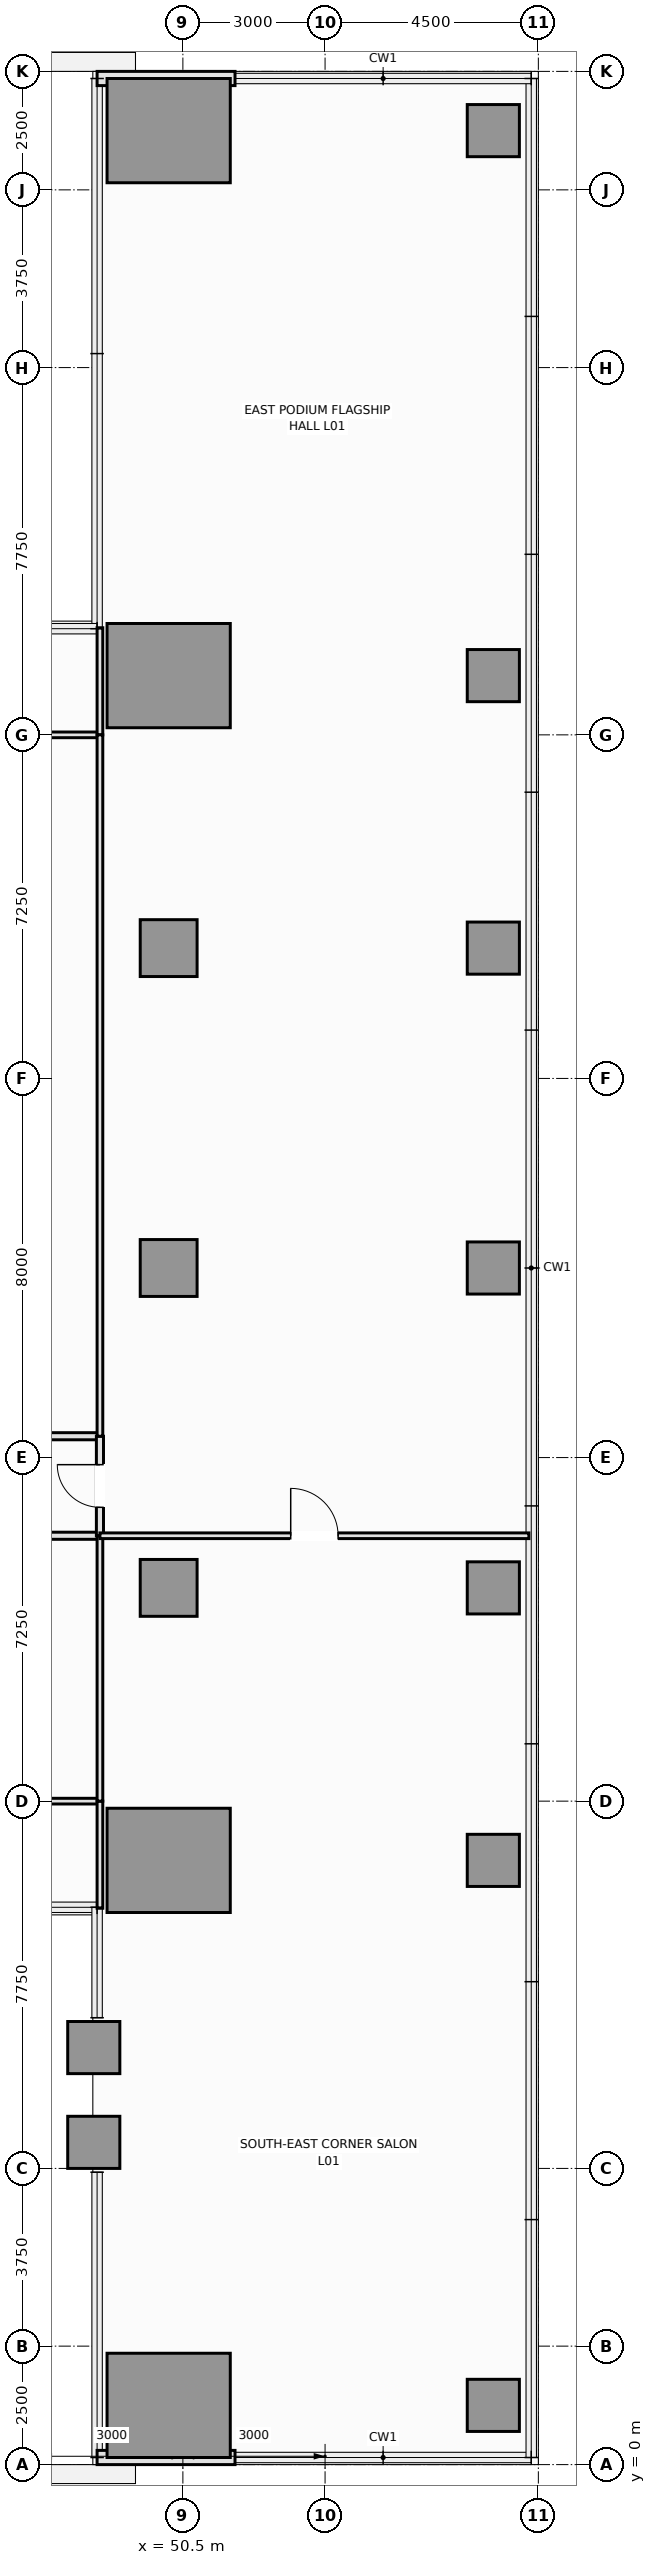
"""IFC4 building model, lengths in metres.
Left out: names, types, materials, properties, quantities, classifications, styles, units other than length and angle.
Written with IfcOpenShell. Run it as: python <this file> out.ifc"""

import sys

from ifc_helpers import new_model, si_unit, direction, frame, frame_2d, origin, origin_2d, place, context, subcontext, project, spatial, rectangle, extrude, element, fill, save


model = new_model("IFC4")
c1 = context("Model", 3, precision=1e-05, world=origin(), true_north=direction((0.0, 1.0)))
c2 = subcontext(c1, "Body", "Model", "MODEL_VIEW")
j1 = project(units=[si_unit("LENGTHUNIT", "METRE"), si_unit("PLANEANGLEUNIT", "RADIAN")], contexts=[c1])
p1 = place(None, origin())
s1 = spatial("IfcSite", under=j1, at=p1, CompositionType="ELEMENT")
p2 = place(p1, origin())
s2 = spatial("IfcBuilding", under=s1, at=p2, CompositionType="ELEMENT")
p3 = place(p2, frame((0.0, 0.0, 6.0)))
s3 = spatial("IfcBuildingStorey", under=s2, at=p3, CompositionType="ELEMENT", Elevation=6.0)
for number, where, z_axis, x_axis in (
    (1, (50.2, 1.25, 0.0), (0.0, 0.0, 1.0), (1.0, 0.0, 0.0)),
    (2, (50.2, 12.75, 0.0), (0.0, 0.0, 1.0), (1.0, 0.0, 0.0)),
    (3, (50.2, 37.75, 0.0), (0.0, 0.0, 1.0), (1.0, 0.0, 0.0)),
    (4, (50.2, 49.25, 0.0), (0.0, 0.0, 1.0), (1.0, 0.0, 0.0)),
):
    element("IfcColumn", number, at=place(p3, frame(where, z_axis=z_axis, x_axis=x_axis)), inside=s3, PredefinedType="COLUMN", context=c2, shape_type="SweptSolid", body=[
        extrude(rectangle(XDim=2.6, YDim=2.2, at=origin_2d()), origin(), (0.0, 0.0, 1.0), 4.8),
    ])
for number, where, z_axis, x_axis in (
    (5, (50.2, 18.5, 0.0), (0.0, 0.0, 1.0), (1.0, 0.0, 0.0)),
    (6, (50.2, 25.25, 0.0), (0.0, 0.0, 1.0), (1.0, 0.0, 0.0)),
    (7, (50.2, 32.0, 0.0), (0.0, 0.0, 1.0), (1.0, 0.0, 0.0)),
):
    element("IfcColumn", number, at=place(p3, frame(where, z_axis=z_axis, x_axis=x_axis)), inside=s3, PredefinedType="COLUMN", context=c2, shape_type="SweptSolid", body=[
        extrude(rectangle(XDim=1.2, YDim=1.2, at=origin_2d()), origin(), (0.0, 0.0, 1.0), 4.8),
    ])
for number, where, z_axis, x_axis in (
    (8, (57.05, 1.25, 0.0), (0.0, 0.0, 1.0), (1.0, 0.0, 0.0)),
    (9, (57.05, 12.75, 0.0), (0.0, 0.0, 1.0), (1.0, 0.0, 0.0)),
    (10, (57.05, 18.5, 0.0), (0.0, 0.0, 1.0), (1.0, 0.0, 0.0)),
    (11, (57.05, 25.25, 0.0), (0.0, 0.0, 1.0), (1.0, 0.0, 0.0)),
    (12, (57.05, 32.0, 0.0), (0.0, 0.0, 1.0), (1.0, 0.0, 0.0)),
    (13, (57.05, 37.75, 0.0), (0.0, 0.0, 1.0), (1.0, 0.0, 0.0)),
    (14, (57.05, 49.25, 0.0), (0.0, 0.0, 1.0), (1.0, 0.0, 0.0)),
    (15, (48.62, 6.8, 0.0), (0.0, 0.0, 1.0), (1.0, 0.0, 0.0)),
    (16, (48.62, 8.8, 0.0), (0.0, 0.0, 1.0), (1.0, 0.0, 0.0)),
):
    element("IfcColumn", number, at=place(p3, frame(where, z_axis=z_axis, x_axis=x_axis)), inside=s3, PredefinedType="COLUMN", context=c2, shape_type="SweptSolid", body=[
        extrude(rectangle(XDim=1.1, YDim=1.1, at=origin_2d()), origin(), (0.0, 0.0, 1.0), 4.8),
    ])
for number, where, z_axis, x_axis in (
    (17, (48.69, 0.15, 0.0), (0.0, 0.0, 1.0), (1.0, 0.0, 0.0)),
    (18, (51.6, 50.35, 0.0), (0.0, 0.0, 1.0), (-1.0, 0.0, 0.0)),
):
    element("IfcWall", number, at=place(p3, frame(where, z_axis=z_axis, x_axis=x_axis)), inside=s3, PredefinedType="SOLIDWALL", context=c2, shape_type="SweptSolid", body=[
        extrude(rectangle(XDim=2.91, YDim=0.3, at=frame_2d((1.455, 0.0))), origin(), (0.0, 0.0, 1.0), 4.6),
    ])
p4 = place(p3, frame((28.4, 19.6, 0.0), z_axis=(0.0, 0.0, 1.0), x_axis=(1.0, 0.0, 0.0)))
e19 = element("IfcWall", 19, at=p4, inside=s3, PredefinedType="PARTITIONING", context=c2, shape_type="SweptSolid", body=[
    extrude(rectangle(XDim=20.35, YDim=0.15, at=frame_2d((10.175, 0.0))), origin(), (0.0, 0.0, 1.0), 4.6),
])
p5 = place(p4, frame((10.796, 0.0, 0.0)))
e20 = element("IfcOpeningElement", 20, at=p5, cuts=e19, PredefinedType="OPENING", context=c2, shape_type="SweptSolid", body=[
    extrude(rectangle(XDim=1.0, YDim=2.15, at=frame_2d((0.5, 1.075))), frame((0.0, 0.085, 0.0), z_axis=(0.0, -1.0, 0.0), x_axis=(1.0, 0.0, 0.0)), (0.0, 0.0, 1.0), 0.17),
])
p6 = place(p3, frame((38.2, 21.7, 0.0), z_axis=(0.0, 0.0, 1.0), x_axis=(1.0, 0.0, 0.0)))
e21 = element("IfcWall", 21, at=p6, inside=s3, PredefinedType="PARTITIONING", context=c2, shape_type="SweptSolid", body=[
    extrude(rectangle(XDim=10.55, YDim=0.15, at=frame_2d((5.275, 0.0))), origin(), (0.0, 0.0, 1.0), 4.6),
])
p7 = place(p6, frame((4.775, 0.0, 0.0)))
e22 = element("IfcOpeningElement", 22, at=p7, cuts=e21, PredefinedType="OPENING", context=c2, shape_type="SweptSolid", body=[
    extrude(rectangle(XDim=1.0, YDim=2.15, at=frame_2d((0.5, 1.075))), frame((0.0, 0.085, 0.0), z_axis=(0.0, -1.0, 0.0), x_axis=(1.0, 0.0, 0.0)), (0.0, 0.0, 1.0), 0.17),
])
p8 = place(p3, frame((48.75, 19.6, 0.0), z_axis=(0.0, 0.0, 1.0), x_axis=(0.0, 1.0, 0.0)))
e23 = element("IfcWall", 23, at=p8, inside=s3, PredefinedType="PARTITIONING", context=c2, shape_type="SweptSolid", body=[
    extrude(rectangle(XDim=2.1, YDim=0.15, at=frame_2d((1.05, 0.0))), origin(), (0.0, 0.0, 1.0), 4.6),
])
p9 = place(p8, frame((0.6, 0.0, 0.0)))
e24 = element("IfcOpeningElement", 24, at=p9, cuts=e23, PredefinedType="OPENING", context=c2, shape_type="SweptSolid", body=[
    extrude(rectangle(XDim=0.9, YDim=2.1, at=frame_2d((0.45, 1.05))), frame((0.0, 0.085, 0.0), z_axis=(0.0, -1.0, 0.0), x_axis=(1.0, 0.0, 0.0)), (0.0, 0.0, 1.0), 0.17),
])
p10 = place(p3, frame((28.4, 14.0, 0.0), z_axis=(0.0, 0.0, 1.0), x_axis=(1.0, 0.0, 0.0)))
e25 = element("IfcWall", 25, at=p10, inside=s3, PredefinedType="PARTITIONING", context=c2, shape_type="SweptSolid", body=[
    extrude(rectangle(XDim=20.35, YDim=0.12, at=frame_2d((10.175, 0.0))), origin(), (0.0, 0.0, 1.0), 4.6),
])
p11 = place(p3, frame((48.75, 11.74, 0.0), z_axis=(0.0, 0.0, 1.0), x_axis=(0.0, 1.0, 0.0)))
e26 = element("IfcWall", 26, at=p11, inside=s3, PredefinedType="PARTITIONING", context=c2, shape_type="SweptSolid", body=[
    extrude(rectangle(XDim=2.26, YDim=0.12, at=frame_2d((1.13, 0.0))), origin(), (0.0, 0.0, 1.0), 4.0),
])
p12 = place(p3, frame((38.2, 36.5, 0.0), z_axis=(0.0, 0.0, 1.0), x_axis=(1.0, 0.0, 0.0)))
e27 = element("IfcWall", 27, at=p12, inside=s3, PredefinedType="PARTITIONING", context=c2, shape_type="SweptSolid", body=[
    extrude(rectangle(XDim=10.55, YDim=0.12, at=frame_2d((5.275, 0.0))), origin(), (0.0, 0.0, 1.0), 4.6),
])
p13 = place(p3, frame((48.75, 36.5, 0.0), z_axis=(0.0, 0.0, 1.0), x_axis=(0.0, 1.0, 0.0)))
e28 = element("IfcWall", 28, at=p13, inside=s3, PredefinedType="PARTITIONING", context=c2, shape_type="SweptSolid", body=[
    extrude(rectangle(XDim=2.26, YDim=0.12, at=frame_2d((1.13, 0.0))), origin(), (0.0, 0.0, 1.0), 4.6),
])
p14 = place(p3, frame((48.75, 14.0, 0.0), z_axis=(0.0, 0.0, 1.0), x_axis=(0.0, 1.0, 0.0)))
e29 = element("IfcWall", 29, at=p14, inside=s3, PredefinedType="PARTITIONING", context=c2, shape_type="SweptSolid", body=[
    extrude(rectangle(XDim=5.6, YDim=0.12, at=frame_2d((2.8, 0.0))), origin(), (0.0, 0.0, 1.0), 4.6),
])
p15 = place(p3, frame((48.75, 21.7, 0.0), z_axis=(0.0, 0.0, 1.0), x_axis=(0.0, 1.0, 0.0)))
e30 = element("IfcWall", 30, at=p15, inside=s3, PredefinedType="PARTITIONING", context=c2, shape_type="SweptSolid", body=[
    extrude(rectangle(XDim=14.8, YDim=0.12, at=frame_2d((7.4, 0.0))), origin(), (0.0, 0.0, 1.0), 4.6),
])
p16 = place(p3, frame((48.75, 19.6, 0.0), z_axis=(0.0, 0.0, 1.0), x_axis=(1.0, 0.0, 0.0)))
e31 = element("IfcWall", 31, at=p16, inside=s3, PredefinedType="PARTITIONING", context=c2, shape_type="SweptSolid", body=[
    extrude(rectangle(XDim=9.05, YDim=0.12, at=frame_2d((4.525, 0.0))), origin(), (0.0, 0.0, 1.0), 4.6),
])
p17 = place(p16, frame((4.025, 0.0, 0.0)))
e32 = element("IfcOpeningElement", 32, at=p17, cuts=e31, PredefinedType="OPENING", context=c2, shape_type="SweptSolid", body=[
    extrude(rectangle(XDim=1.0, YDim=2.15, at=frame_2d((0.5, 1.075))), frame((0.0, 0.07, 0.0), z_axis=(0.0, -1.0, 0.0), x_axis=(1.0, 0.0, 0.0)), (0.0, 0.0, 1.0), 0.14),
])
p18 = place(p9, origin())
e33 = element("IfcDoor", 33, at=p18, inside=s3, OperationType="SINGLE_SWING_RIGHT", PredefinedType="DOOR", context=c2, shape_type="SweptSolid", body=[
    extrude(rectangle(XDim=0.9, YDim=2.1, at=frame_2d((0.45, 1.05))), frame((0.0, 0.025, 0.0), z_axis=(0.0, -1.0, 0.0), x_axis=(1.0, 0.0, 0.0)), (0.0, 0.0, 1.0), 0.05),
])
fill(e24, e33)
p19 = place(p17, origin())
e34 = element("IfcDoor", 34, at=p19, inside=s3, OperationType="SINGLE_SWING_LEFT", PredefinedType="DOOR", context=c2, shape_type="SweptSolid", body=[
    extrude(rectangle(XDim=1.0, YDim=2.15, at=frame_2d((0.5, 1.075))), frame((0.0, 0.025, 0.0), z_axis=(0.0, -1.0, 0.0), x_axis=(1.0, 0.0, 0.0)), (0.0, 0.0, 1.0), 0.05),
])
fill(e32, e34)
save(model, sys.argv[1])
